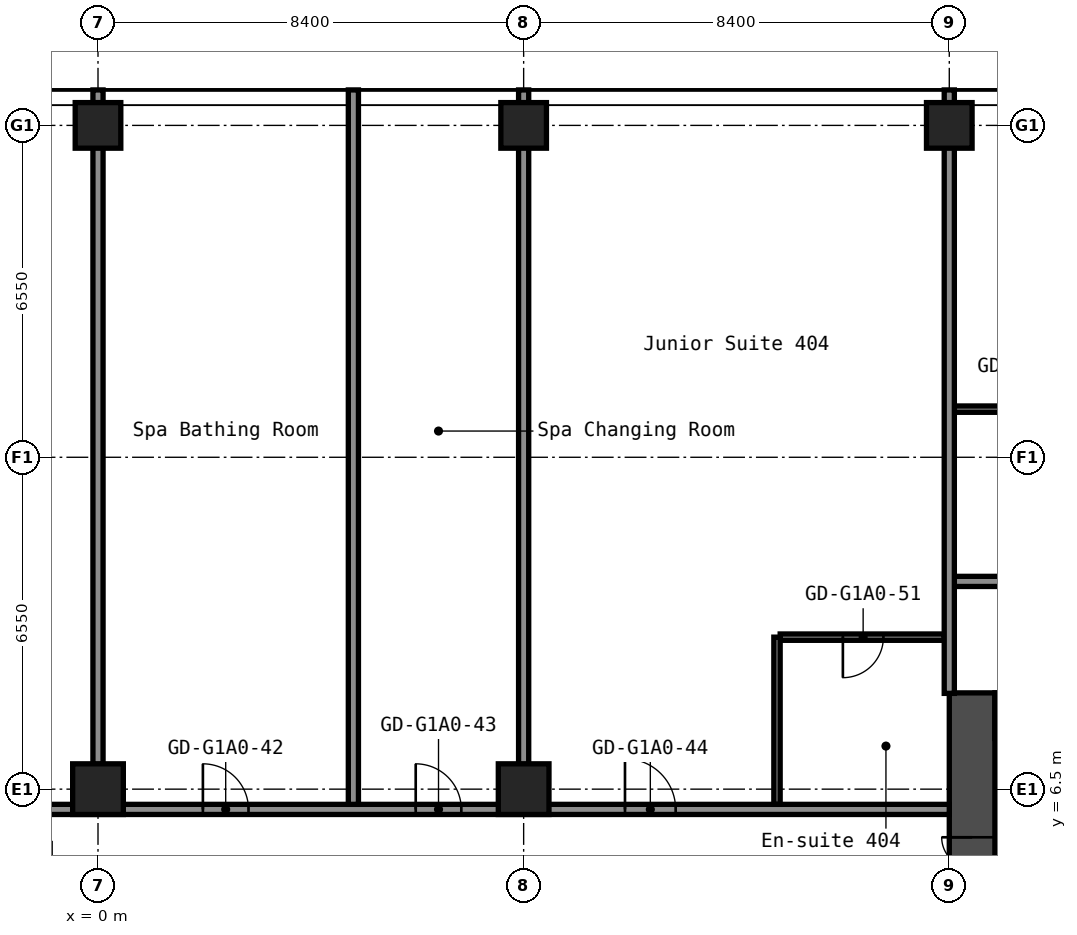
"""IFC4 building model, lengths in metres.
Left out: names, types, materials, properties, quantities, classifications, styles, units other than length and angle.
Written with IfcOpenShell. Run it as: python <this file> out.ifc"""

import sys

from ifc_helpers import new_model, si_unit, direction, frame, frame_2d, origin, origin_2d, place, context, subcontext, project, spatial, rectangle, hollow_rectangle, extrude, element, fill, save


model = new_model("IFC4")
c1 = context("Model", 3, precision=1e-05, world=origin(), true_north=direction((0.0, 1.0)))
c2 = subcontext(c1, "Body", "Model", "MODEL_VIEW")
j1 = project(units=[si_unit("LENGTHUNIT", "METRE"), si_unit("PLANEANGLEUNIT", "RADIAN")], contexts=[c1])
p1 = place(None, origin())
s1 = spatial("IfcSite", under=j1, at=p1, CompositionType="ELEMENT")
p2 = place(p1, origin())
s2 = spatial("IfcBuilding", under=s1, at=p2, CompositionType="ELEMENT")
p3 = place(p2, frame((0.0, 0.0, 19.8)))
s3 = spatial("IfcBuildingStorey", under=s2, at=p3, CompositionType="ELEMENT", Elevation=19.8)
p4 = place(p3, frame((0.0, 6.5, 0.0), z_axis=(0.0, 0.0, 1.0), x_axis=(1.0, 0.0, 0.0)))
e1 = element("IfcColumn", 1, at=p4, inside=s3, PredefinedType="COLUMN", context=c2, shape_type="SweptSolid", body=[
    extrude(hollow_rectangle(XDim=1.0, YDim=1.0, WallThickness=0.04, at=origin_2d()), origin(), (0.0, 0.0, 1.0), 2.8),
])
p5 = place(p3, frame((0.0, 19.6, 0.0), z_axis=(0.0, 0.0, 1.0), x_axis=(1.0, 0.0, 0.0)))
e2 = element("IfcColumn", 2, at=p5, inside=s3, PredefinedType="COLUMN", context=c2, shape_type="SweptSolid", body=[
    extrude(hollow_rectangle(XDim=0.9, YDim=0.9, WallThickness=0.036, at=origin_2d()), origin(), (0.0, 0.0, 1.0), 2.8),
])
p6 = place(p3, frame((8.4, 6.5, 0.0), z_axis=(0.0, 0.0, 1.0), x_axis=(1.0, 0.0, 0.0)))
e3 = element("IfcColumn", 3, at=p6, inside=s3, PredefinedType="COLUMN", context=c2, shape_type="SweptSolid", body=[
    extrude(hollow_rectangle(XDim=1.0, YDim=1.0, WallThickness=0.04, at=origin_2d()), origin(), (0.0, 0.0, 1.0), 2.8),
])
for number, where, z_axis, x_axis in (
    (4, (8.4, 19.6, 0.0), (0.0, 0.0, 1.0), (1.0, 0.0, 0.0)),
    (5, (16.8, 19.6, 0.0), (0.0, 0.0, 1.0), (1.0, 0.0, 0.0)),
):
    element("IfcColumn", number, at=place(p3, frame(where, z_axis=z_axis, x_axis=x_axis)), inside=s3, PredefinedType="COLUMN", context=c2, shape_type="SweptSolid", body=[
        extrude(hollow_rectangle(XDim=0.9, YDim=0.9, WallThickness=0.036, at=origin_2d()), origin(), (0.0, 0.0, 1.0), 2.8),
    ])
p7 = place(p3, frame((17.25, -8.4, 0.0), z_axis=(0.0, 0.0, 1.0), x_axis=(0.0, 1.0, 0.0)))
e6 = element("IfcWall", 6, at=p7, inside=s3, PredefinedType="SHEAR", context=c2, shape_type="SweptSolid", body=[
    extrude(rectangle(XDim=16.8, YDim=0.9, at=frame_2d((8.4, 0.0))), origin(), (0.0, 0.0, 1.0), 2.8),
])
p8 = place(p7, frame((12.75, 0.0, 0.0)))
e7 = element("IfcOpeningElement", 7, at=p8, cuts=e6, PredefinedType="OPENING", context=c2, shape_type="SweptSolid", body=[
    extrude(rectangle(XDim=1.2, YDim=2.1, at=frame_2d((0.6, 1.05))), frame((0.0, 0.46, 0.0), z_axis=(0.0, -1.0, 0.0), x_axis=(1.0, 0.0, 0.0)), (0.0, 0.0, 1.0), 0.92),
])
p9 = place(p7, frame((2.85, 0.0, 0.0)))
e8 = element("IfcOpeningElement", 8, at=p9, cuts=e6, PredefinedType="OPENING", context=c2, shape_type="SweptSolid", body=[
    extrude(rectangle(XDim=1.2, YDim=2.1, at=frame_2d((0.6, 1.05))), frame((0.0, 0.46, 0.0), z_axis=(0.0, -1.0, 0.0), x_axis=(1.0, 0.0, 0.0)), (0.0, 0.0, 1.0), 0.92),
])
p10 = place(p3, frame((17.7, 7.95, 0.0), z_axis=(0.0, 0.0, 1.0), x_axis=(1.0, 0.0, 0.0)))
e9 = element("IfcWall", 9, at=p10, inside=s3, PredefinedType="SHEAR", context=c2, shape_type="SweptSolid", body=[
    extrude(rectangle(XDim=15.0, YDim=0.9, at=frame_2d((7.5, 0.0))), origin(), (0.0, 0.0, 1.0), 2.8),
])
p11 = place(p10, frame((10.4, 0.0, 0.0)))
e10 = element("IfcOpeningElement", 10, at=p11, cuts=e9, PredefinedType="OPENING", context=c2, shape_type="SweptSolid", body=[
    extrude(rectangle(XDim=1.2, YDim=2.1, at=frame_2d((0.6, 1.05))), frame((0.0, 0.46, 0.0), z_axis=(0.0, -1.0, 0.0), x_axis=(1.0, 0.0, 0.0)), (0.0, 0.0, 1.0), 0.92),
])
p12 = place(p10, frame((13.35, 0.0, 0.0)))
e11 = element("IfcOpeningElement", 11, at=p12, cuts=e9, PredefinedType="OPENING", context=c2, shape_type="SweptSolid", body=[
    extrude(rectangle(XDim=0.9, YDim=2.1, at=frame_2d((0.45, 1.05))), frame((0.0, 0.46, 0.0), z_axis=(0.0, -1.0, 0.0), x_axis=(1.0, 0.0, 0.0)), (0.0, 0.0, 1.0), 0.92),
])
p13 = place(p3, frame((-16.8, 6.1, 0.0), z_axis=(0.0, 0.0, 1.0), x_axis=(1.0, 0.0, 0.0)))
e12 = element("IfcWall", 12, at=p13, inside=s3, PredefinedType="PARTITIONING", context=c2, shape_type="SweptSolid", body=[
    extrude(rectangle(XDim=33.6, YDim=0.2, at=frame_2d((16.8, 0.0))), origin(), (0.0, 0.0, 1.0), 2.8),
])
p14 = place(p13, frame((5.4, 0.0, 0.0)))
e13 = element("IfcOpeningElement", 13, at=p14, cuts=e12, PredefinedType="OPENING", context=c2, shape_type="SweptSolid", body=[
    extrude(rectangle(XDim=1.0, YDim=2.1, at=frame_2d((0.5, 1.05))), frame((0.0, 0.11, 0.0), z_axis=(0.0, -1.0, 0.0), x_axis=(1.0, 0.0, 0.0)), (0.0, 0.0, 1.0), 0.22),
])
p15 = place(p13, frame((12.1, 0.0, 0.0)))
e14 = element("IfcOpeningElement", 14, at=p15, cuts=e12, PredefinedType="OPENING", context=c2, shape_type="SweptSolid", body=[
    extrude(rectangle(XDim=1.0, YDim=2.1, at=frame_2d((0.5, 1.05))), frame((0.0, 0.11, 0.0), z_axis=(0.0, -1.0, 0.0), x_axis=(1.0, 0.0, 0.0)), (0.0, 0.0, 1.0), 0.22),
])
p16 = place(p13, frame((18.87, 0.0, 0.0)))
e15 = element("IfcOpeningElement", 15, at=p16, cuts=e12, PredefinedType="OPENING", context=c2, shape_type="SweptSolid", body=[
    extrude(rectangle(XDim=0.9, YDim=2.1, at=frame_2d((0.45, 1.05))), frame((0.0, 0.11, 0.0), z_axis=(0.0, -1.0, 0.0), x_axis=(1.0, 0.0, 0.0)), (0.0, 0.0, 1.0), 0.22),
])
p17 = place(p13, frame((23.07, 0.0, 0.0)))
e16 = element("IfcOpeningElement", 16, at=p17, cuts=e12, PredefinedType="OPENING", context=c2, shape_type="SweptSolid", body=[
    extrude(rectangle(XDim=0.9, YDim=2.1, at=frame_2d((0.45, 1.05))), frame((0.0, 0.11, 0.0), z_axis=(0.0, -1.0, 0.0), x_axis=(1.0, 0.0, 0.0)), (0.0, 0.0, 1.0), 0.22),
])
p18 = place(p13, frame((27.2, 0.0, 0.0)))
e17 = element("IfcOpeningElement", 17, at=p18, cuts=e12, PredefinedType="OPENING", context=c2, shape_type="SweptSolid", body=[
    extrude(rectangle(XDim=1.0, YDim=2.1, at=frame_2d((0.5, 1.05))), frame((0.0, 0.11, 0.0), z_axis=(0.0, -1.0, 0.0), x_axis=(1.0, 0.0, 0.0)), (0.0, 0.0, 1.0), 0.22),
])
p19 = place(p3, frame((13.462, 9.5, 0.0), z_axis=(0.0, 0.0, 1.0), x_axis=(1.0, 0.0, 0.0)))
e18 = element("IfcWall", 18, at=p19, inside=s3, PredefinedType="PARTITIONING", context=c2, shape_type="SweptSolid", body=[
    extrude(rectangle(XDim=3.238, YDim=0.125, at=frame_2d((1.619, 0.0))), origin(), (0.0, 0.0, 1.0), 2.8),
])
p20 = place(p19, frame((1.238, 0.0, 0.0)))
e19 = element("IfcOpeningElement", 19, at=p20, cuts=e18, PredefinedType="OPENING", context=c2, shape_type="SweptSolid", body=[
    extrude(rectangle(XDim=0.8, YDim=2.1, at=frame_2d((0.4, 1.05))), frame((0.0, 0.073, 0.0), z_axis=(0.0, -1.0, 0.0), x_axis=(1.0, 0.0, 0.0)), (0.0, 0.0, 1.0), 0.145),
])
p21 = place(p3, frame((16.8, 10.6, 0.0), z_axis=(0.0, 0.0, 1.0), x_axis=(1.0, 0.0, 0.0)))
e20 = element("IfcWall", 20, at=p21, inside=s3, PredefinedType="PARTITIONING", context=c2, shape_type="SweptSolid", body=[
    extrude(rectangle(XDim=34.3, YDim=0.2, at=frame_2d((17.15, 0.0))), origin(), (0.0, 0.0, 1.0), 2.8),
])
p22 = place(p21, frame((5.4, 0.0, 0.0)))
e21 = element("IfcOpeningElement", 21, at=p22, cuts=e20, PredefinedType="OPENING", context=c2, shape_type="SweptSolid", body=[
    extrude(rectangle(XDim=1.0, YDim=2.1, at=frame_2d((0.5, 1.05))), frame((0.0, 0.11, 0.0), z_axis=(0.0, -1.0, 0.0), x_axis=(1.0, 0.0, 0.0)), (0.0, 0.0, 1.0), 0.22),
])
p23 = place(p21, frame((10.4, 0.0, 0.0)))
e22 = element("IfcOpeningElement", 22, at=p23, cuts=e20, PredefinedType="OPENING", context=c2, shape_type="SweptSolid", body=[
    extrude(rectangle(XDim=1.0, YDim=2.1, at=frame_2d((0.5, 1.05))), frame((0.0, 0.11, 0.0), z_axis=(0.0, -1.0, 0.0), x_axis=(1.0, 0.0, 0.0)), (0.0, 0.0, 1.0), 0.22),
])
p24 = place(p21, frame((22.2, 0.0, 0.0)))
e23 = element("IfcOpeningElement", 23, at=p24, cuts=e20, PredefinedType="OPENING", context=c2, shape_type="SweptSolid", body=[
    extrude(rectangle(XDim=1.0, YDim=2.1, at=frame_2d((0.5, 1.05))), frame((0.0, 0.11, 0.0), z_axis=(0.0, -1.0, 0.0), x_axis=(1.0, 0.0, 0.0)), (0.0, 0.0, 1.0), 0.22),
])
p25 = place(p21, frame((27.4, 0.0, 0.0)))
e24 = element("IfcOpeningElement", 24, at=p25, cuts=e20, PredefinedType="OPENING", context=c2, shape_type="SweptSolid", body=[
    extrude(rectangle(XDim=1.0, YDim=2.1, at=frame_2d((0.5, 1.05))), frame((0.0, 0.11, 0.0), z_axis=(0.0, -1.0, 0.0), x_axis=(1.0, 0.0, 0.0)), (0.0, 0.0, 1.0), 0.22),
])
p26 = place(p3, frame((16.9, 14.0, 0.0), z_axis=(0.0, 0.0, 1.0), x_axis=(1.0, 0.0, 0.0)))
e25 = element("IfcWall", 25, at=p26, inside=s3, PredefinedType="PARTITIONING", context=c2, shape_type="SweptSolid", body=[
    extrude(rectangle(XDim=3.238, YDim=0.125, at=frame_2d((1.619, 0.0))), origin(), (0.0, 0.0, 1.0), 2.8),
])
p27 = place(p26, frame((1.2, 0.0, 0.0)))
e26 = element("IfcOpeningElement", 26, at=p27, cuts=e25, PredefinedType="OPENING", context=c2, shape_type="SweptSolid", body=[
    extrude(rectangle(XDim=0.8, YDim=2.1, at=frame_2d((0.4, 1.05))), frame((0.0, 0.073, 0.0), z_axis=(0.0, -1.0, 0.0), x_axis=(1.0, 0.0, 0.0)), (0.0, 0.0, 1.0), 0.145),
])
p28 = place(p3, frame((0.0, 6.99, 0.0), z_axis=(0.0, 0.0, 1.0), x_axis=(0.0, 1.0, 0.0)))
e27 = element("IfcWall", 27, at=p28, inside=s3, PredefinedType="PARTITIONING", context=c2, shape_type="SweptSolid", body=[
    extrude(rectangle(XDim=13.31, YDim=0.2, at=frame_2d((6.655, 0.0))), origin(), (0.0, 0.0, 1.0), 2.8),
])
p29 = place(p3, frame((5.04, 6.2, 0.0), z_axis=(0.0, 0.0, 1.0), x_axis=(0.0, 1.0, 0.0)))
e28 = element("IfcWall", 28, at=p29, inside=s3, PredefinedType="PARTITIONING", context=c2, shape_type="SweptSolid", body=[
    extrude(rectangle(XDim=14.1, YDim=0.2, at=frame_2d((7.05, 0.0))), origin(), (0.0, 0.0, 1.0), 2.8),
])
p30 = place(p3, frame((8.4, 6.99, 0.0), z_axis=(0.0, 0.0, 1.0), x_axis=(0.0, 1.0, 0.0)))
e29 = element("IfcWall", 29, at=p30, inside=s3, PredefinedType="PARTITIONING", context=c2, shape_type="SweptSolid", body=[
    extrude(rectangle(XDim=13.31, YDim=0.2, at=frame_2d((6.655, 0.0))), origin(), (0.0, 0.0, 1.0), 2.8),
])
p31 = place(p3, frame((13.4, 6.2, 0.0), z_axis=(0.0, 0.0, 1.0), x_axis=(0.0, 1.0, 0.0)))
e30 = element("IfcWall", 30, at=p31, inside=s3, PredefinedType="PARTITIONING", context=c2, shape_type="SweptSolid", body=[
    extrude(rectangle(XDim=3.3, YDim=0.125, at=frame_2d((1.65, 0.0))), origin(), (0.0, 0.0, 1.0), 2.8),
])
p32 = place(p3, frame((16.8, 8.39, 0.0), z_axis=(0.0, 0.0, 1.0), x_axis=(0.0, 1.0, 0.0)))
e31 = element("IfcWall", 31, at=p32, inside=s3, PredefinedType="PARTITIONING", context=c2, shape_type="SweptSolid", body=[
    extrude(rectangle(XDim=11.91, YDim=0.2, at=frame_2d((5.955, 0.0))), origin(), (0.0, 0.0, 1.0), 2.8),
])
p33 = place(p8, origin())
e32 = element("IfcDoor", 32, at=p33, inside=s3, OperationType="DOUBLE_DOOR_SINGLE_SWING", PredefinedType="DOOR", context=c2, shape_type="SweptSolid", body=[
    extrude(rectangle(XDim=1.2, YDim=2.1, at=frame_2d((0.6, 1.05))), frame((0.0, 0.025, 0.0), z_axis=(0.0, -1.0, 0.0), x_axis=(1.0, 0.0, 0.0)), (0.0, 0.0, 1.0), 0.05),
])
fill(e7, e32)
p34 = place(p16, origin())
e33 = element("IfcDoor", 33, at=p34, inside=s3, OperationType="SINGLE_SWING_RIGHT", PredefinedType="DOOR", context=c2, shape_type="SweptSolid", body=[
    extrude(rectangle(XDim=0.9, YDim=2.1, at=frame_2d((0.45, 1.05))), frame((0.0, 0.025, 0.0), z_axis=(0.0, -1.0, 0.0), x_axis=(1.0, 0.0, 0.0)), (0.0, 0.0, 1.0), 0.05),
])
fill(e15, e33)
p35 = place(p17, origin())
e34 = element("IfcDoor", 34, at=p35, inside=s3, OperationType="SINGLE_SWING_RIGHT", PredefinedType="DOOR", context=c2, shape_type="SweptSolid", body=[
    extrude(rectangle(XDim=0.9, YDim=2.1, at=frame_2d((0.45, 1.05))), frame((0.0, 0.025, 0.0), z_axis=(0.0, -1.0, 0.0), x_axis=(1.0, 0.0, 0.0)), (0.0, 0.0, 1.0), 0.05),
])
fill(e16, e34)
p36 = place(p18, origin())
e35 = element("IfcDoor", 35, at=p36, inside=s3, OperationType="SINGLE_SWING_RIGHT", PredefinedType="DOOR", context=c2, shape_type="SweptSolid", body=[
    extrude(rectangle(XDim=1.0, YDim=2.1, at=frame_2d((0.5, 1.05))), frame((0.0, 0.025, 0.0), z_axis=(0.0, -1.0, 0.0), x_axis=(1.0, 0.0, 0.0)), (0.0, 0.0, 1.0), 0.05),
])
fill(e17, e35)
p37 = place(p20, origin())
e36 = element("IfcDoor", 36, at=p37, inside=s3, OperationType="SINGLE_SWING_LEFT", PredefinedType="DOOR", context=c2, shape_type="SweptSolid", body=[
    extrude(rectangle(XDim=0.8, YDim=2.1, at=frame_2d((0.4, 1.05))), frame((0.0, 0.025, 0.0), z_axis=(0.0, -1.0, 0.0), x_axis=(1.0, 0.0, 0.0)), (0.0, 0.0, 1.0), 0.05),
])
fill(e19, e36)
save(model, sys.argv[1])
